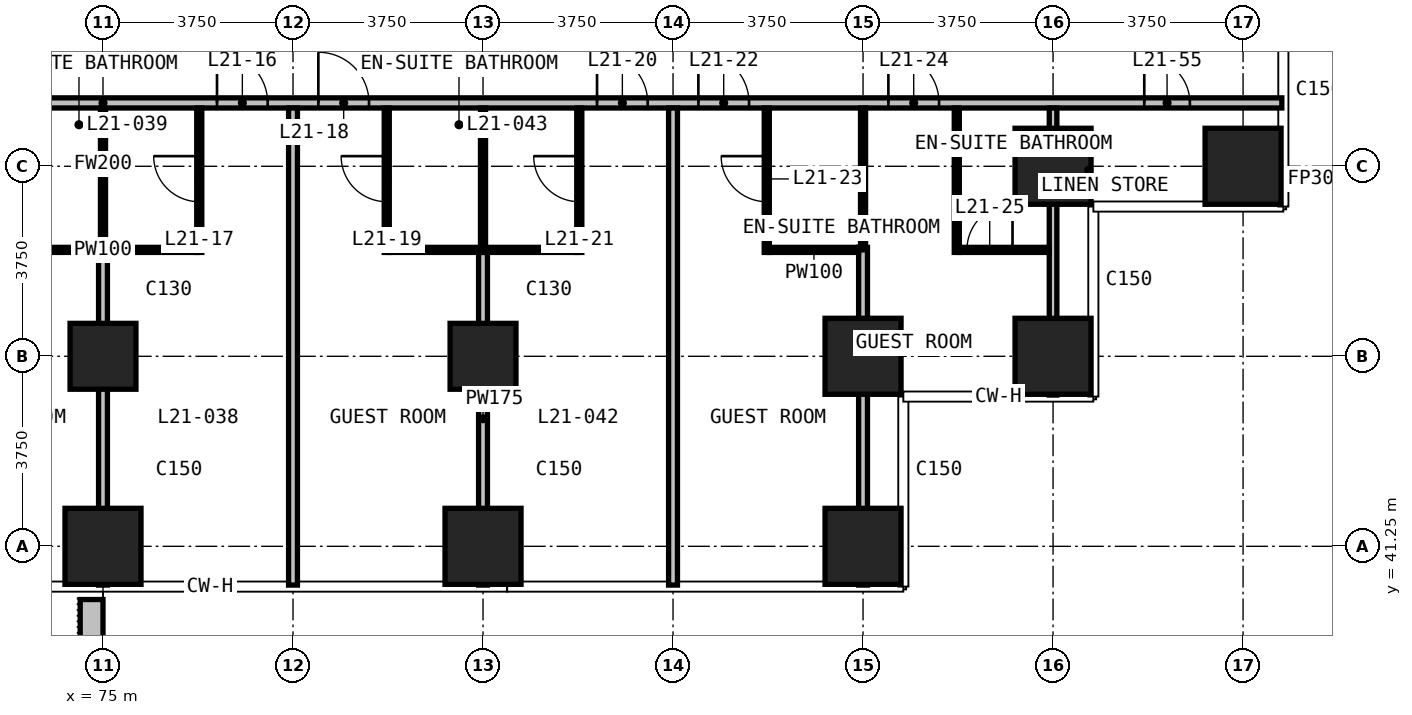
"""IFC4 building model, lengths in metres.
Left out: names, types, materials, properties, quantities, classifications, styles, units other than length and angle.
Written with IfcOpenShell. Run it as: python <this file> out.ifc"""

import sys

from ifc_helpers import new_model, si_unit, direction, frame, frame_2d, origin, origin_2d, place, context, subcontext, project, spatial, rectangle, extrude, element, fill, save


model = new_model("IFC4")
c1 = context("Model", 3, precision=1e-05, world=origin(), true_north=direction((0.0, 1.0)))
c2 = subcontext(c1, "Body", "Model", "MODEL_VIEW")
j1 = project(units=[si_unit("LENGTHUNIT", "METRE"), si_unit("PLANEANGLEUNIT", "RADIAN")], contexts=[c1])
p1 = place(None, origin())
s1 = spatial("IfcSite", under=j1, at=p1, CompositionType="ELEMENT")
p2 = place(p1, origin())
s2 = spatial("IfcBuilding", under=s1, at=p2, CompositionType="ELEMENT")
p3 = place(p2, frame((0.0, 0.0, 89.0)))
s3 = spatial("IfcBuildingStorey", under=s2, at=p3, CompositionType="ELEMENT", Elevation=89.0)
p4 = place(p3, frame((75.0, 41.25, 0.0), z_axis=(0.0, 0.0, 1.0), x_axis=(1.0, 0.0, 0.0)))
e1 = element("IfcColumn", 1, at=p4, inside=s3, PredefinedType="COLUMN", context=c2, shape_type="SweptSolid", body=[
    extrude(rectangle(XDim=1.5, YDim=1.5, at=origin_2d()), origin(), (0.0, 0.0, 1.0), 3.3),
])
p5 = place(p3, frame((75.0, 45.0, 0.0), z_axis=(0.0, 0.0, 1.0), x_axis=(1.0, 0.0, 0.0)))
e2 = element("IfcColumn", 2, at=p5, inside=s3, PredefinedType="COLUMN", context=c2, shape_type="SweptSolid", body=[
    extrude(rectangle(XDim=1.3, YDim=1.3, at=origin_2d()), origin(), (0.0, 0.0, 1.0), 3.3),
])
p6 = place(p3, frame((82.5, 41.25, 0.0), z_axis=(0.0, 0.0, 1.0), x_axis=(1.0, 0.0, 0.0)))
e3 = element("IfcColumn", 3, at=p6, inside=s3, PredefinedType="COLUMN", context=c2, shape_type="SweptSolid", body=[
    extrude(rectangle(XDim=1.5, YDim=1.5, at=origin_2d()), origin(), (0.0, 0.0, 1.0), 3.3),
])
p7 = place(p3, frame((82.5, 45.0, 0.0), z_axis=(0.0, 0.0, 1.0), x_axis=(1.0, 0.0, 0.0)))
e4 = element("IfcColumn", 4, at=p7, inside=s3, PredefinedType="COLUMN", context=c2, shape_type="SweptSolid", body=[
    extrude(rectangle(XDim=1.3, YDim=1.3, at=origin_2d()), origin(), (0.0, 0.0, 1.0), 3.3),
])
for number, where, z_axis, x_axis in (
    (5, (90.0, 41.25, 0.0), (0.0, 0.0, 1.0), (1.0, 0.0, 0.0)),
    (6, (90.0, 45.0, 0.0), (0.0, 0.0, 1.0), (1.0, 0.0, 0.0)),
    (7, (93.75, 45.0, 0.0), (0.0, 0.0, 1.0), (1.0, 0.0, 0.0)),
    (8, (93.75, 48.75, 0.0), (0.0, 0.0, 1.0), (1.0, 0.0, 0.0)),
    (9, (97.5, 48.75, 0.0), (0.0, 0.0, 1.0), (1.0, 0.0, 0.0)),
):
    element("IfcColumn", number, at=place(p3, frame(where, z_axis=z_axis, x_axis=x_axis)), inside=s3, PredefinedType="COLUMN", context=c2, shape_type="SweptSolid", body=[
        extrude(rectangle(XDim=1.5, YDim=1.5, at=origin_2d()), origin(), (0.0, 0.0, 1.0), 3.3),
    ])
p8 = place(p3, frame((74.775, 40.2, 0.0), z_axis=(0.0, 0.0, 1.0), x_axis=(0.0, -1.0, 0.0)))
e10 = element("IfcWall", 10, at=p8, inside=s3, PredefinedType="USERDEFINED", context=c2, shape_type="SweptSolid", body=[
    extrude(rectangle(XDim=2.35, YDim=0.45, at=frame_2d((1.175, 0.0))), origin(), (0.0, 0.0, 1.0), 1.1),
])
p9 = place(p3, frame((51.735, 50.0, 0.0), z_axis=(0.0, 0.0, 1.0), x_axis=(1.0, 0.0, 0.0)))
e11 = element("IfcWall", 11, at=p9, inside=s3, PredefinedType="PARTITIONING", context=c2, shape_type="SweptSolid", body=[
    extrude(rectangle(XDim=46.53, YDim=0.2, at=frame_2d((23.265, 0.0))), origin(), (0.0, 0.0, 1.0), 3.0),
])
p10 = place(p9, frame((6.765, 0.0, 0.0)))
e12 = element("IfcOpeningElement", 12, at=p10, cuts=e11, PredefinedType="OPENING", context=c2, shape_type="SweptSolid", body=[
    extrude(rectangle(XDim=1.0, YDim=2.2, at=frame_2d((0.5, 1.1))), frame((0.0, 0.11, 0.0), z_axis=(0.0, -1.0, 0.0), x_axis=(1.0, 0.0, 0.0)), (0.0, 0.0, 1.0), 0.22),
])
p11 = place(p9, frame((10.515, 0.0, 0.0)))
e13 = element("IfcOpeningElement", 13, at=p11, cuts=e11, PredefinedType="OPENING", context=c2, shape_type="SweptSolid", body=[
    extrude(rectangle(XDim=1.0, YDim=2.2, at=frame_2d((0.5, 1.1))), frame((0.0, 0.11, 0.0), z_axis=(0.0, -1.0, 0.0), x_axis=(1.0, 0.0, 0.0)), (0.0, 0.0, 1.0), 0.22),
])
p12 = place(p9, frame((12.515, 0.0, 0.0)))
e14 = element("IfcOpeningElement", 14, at=p12, cuts=e11, PredefinedType="OPENING", context=c2, shape_type="SweptSolid", body=[
    extrude(rectangle(XDim=1.0, YDim=2.2, at=frame_2d((0.5, 1.1))), frame((0.0, 0.11, 0.0), z_axis=(0.0, -1.0, 0.0), x_axis=(1.0, 0.0, 0.0)), (0.0, 0.0, 1.0), 0.22),
])
p13 = place(p9, frame((18.015, 0.0, 0.0)))
e15 = element("IfcOpeningElement", 15, at=p13, cuts=e11, PredefinedType="OPENING", context=c2, shape_type="SweptSolid", body=[
    extrude(rectangle(XDim=1.0, YDim=2.2, at=frame_2d((0.5, 1.1))), frame((0.0, 0.11, 0.0), z_axis=(0.0, -1.0, 0.0), x_axis=(1.0, 0.0, 0.0)), (0.0, 0.0, 1.0), 0.22),
])
p14 = place(p9, frame((20.015, 0.0, 0.0)))
e16 = element("IfcOpeningElement", 16, at=p14, cuts=e11, PredefinedType="OPENING", context=c2, shape_type="SweptSolid", body=[
    extrude(rectangle(XDim=1.0, YDim=2.2, at=frame_2d((0.5, 1.1))), frame((0.0, 0.11, 0.0), z_axis=(0.0, -1.0, 0.0), x_axis=(1.0, 0.0, 0.0)), (0.0, 0.0, 1.0), 0.22),
])
p15 = place(p9, frame((25.515, 0.0, 0.0)))
e17 = element("IfcOpeningElement", 17, at=p15, cuts=e11, PredefinedType="OPENING", context=c2, shape_type="SweptSolid", body=[
    extrude(rectangle(XDim=1.0, YDim=2.2, at=frame_2d((0.5, 1.1))), frame((0.0, 0.11, 0.0), z_axis=(0.0, -1.0, 0.0), x_axis=(1.0, 0.0, 0.0)), (0.0, 0.0, 1.0), 0.22),
])
p16 = place(p9, frame((27.515, 0.0, 0.0)))
e18 = element("IfcOpeningElement", 18, at=p16, cuts=e11, PredefinedType="OPENING", context=c2, shape_type="SweptSolid", body=[
    extrude(rectangle(XDim=1.0, YDim=2.2, at=frame_2d((0.5, 1.1))), frame((0.0, 0.11, 0.0), z_axis=(0.0, -1.0, 0.0), x_axis=(1.0, 0.0, 0.0)), (0.0, 0.0, 1.0), 0.22),
])
p17 = place(p9, frame((33.015, 0.0, 0.0)))
e19 = element("IfcOpeningElement", 19, at=p17, cuts=e11, PredefinedType="OPENING", context=c2, shape_type="SweptSolid", body=[
    extrude(rectangle(XDim=1.0, YDim=2.2, at=frame_2d((0.5, 1.1))), frame((0.0, 0.11, 0.0), z_axis=(0.0, -1.0, 0.0), x_axis=(1.0, 0.0, 0.0)), (0.0, 0.0, 1.0), 0.22),
])
p18 = place(p9, frame((35.015, 0.0, 0.0)))
e20 = element("IfcOpeningElement", 20, at=p18, cuts=e11, PredefinedType="OPENING", context=c2, shape_type="SweptSolid", body=[
    extrude(rectangle(XDim=1.0, YDim=2.2, at=frame_2d((0.5, 1.1))), frame((0.0, 0.11, 0.0), z_axis=(0.0, -1.0, 0.0), x_axis=(1.0, 0.0, 0.0)), (0.0, 0.0, 1.0), 0.22),
])
p19 = place(p9, frame((38.765, 0.0, 0.0)))
e21 = element("IfcOpeningElement", 21, at=p19, cuts=e11, PredefinedType="OPENING", context=c2, shape_type="SweptSolid", body=[
    extrude(rectangle(XDim=1.0, YDim=2.2, at=frame_2d((0.5, 1.1))), frame((0.0, 0.11, 0.0), z_axis=(0.0, -1.0, 0.0), x_axis=(1.0, 0.0, 0.0)), (0.0, 0.0, 1.0), 0.22),
])
p20 = place(p9, frame((1.8, 0.0, 0.0)))
e22 = element("IfcOpeningElement", 22, at=p20, cuts=e11, PredefinedType="OPENING", context=c2, shape_type="SweptSolid", body=[
    extrude(rectangle(XDim=0.9, YDim=2.2, at=frame_2d((0.45, 1.1))), frame((0.0, 0.11, 0.0), z_axis=(0.0, -1.0, 0.0), x_axis=(1.0, 0.0, 0.0)), (0.0, 0.0, 1.0), 0.22),
])
p21 = place(p9, frame((43.815, 0.0, 0.0)))
e23 = element("IfcOpeningElement", 23, at=p21, cuts=e11, PredefinedType="OPENING", context=c2, shape_type="SweptSolid", body=[
    extrude(rectangle(XDim=0.9, YDim=2.2, at=frame_2d((0.45, 1.1))), frame((0.0, 0.11, 0.0), z_axis=(0.0, -1.0, 0.0), x_axis=(1.0, 0.0, 0.0)), (0.0, 0.0, 1.0), 0.22),
])
p22 = place(p3, frame((75.0, 40.485, 0.0), z_axis=(0.0, 0.0, 1.0), x_axis=(0.0, 1.0, 0.0)))
e24 = element("IfcWall", 24, at=p22, inside=s3, PredefinedType="PARTITIONING", context=c2, shape_type="SweptSolid", body=[
    extrude(rectangle(XDim=6.565, YDim=0.175, at=frame_2d((3.282, 0.0))), origin(), (0.0, 0.0, 1.0), 3.0),
])
p23 = place(p3, frame((78.75, 40.485, 0.0), z_axis=(0.0, 0.0, 1.0), x_axis=(0.0, 1.0, 0.0)))
e25 = element("IfcWall", 25, at=p23, inside=s3, PredefinedType="PARTITIONING", context=c2, shape_type="SweptSolid", body=[
    extrude(rectangle(XDim=9.415, YDim=0.175, at=frame_2d((4.708, 0.0))), origin(), (0.0, 0.0, 1.0), 3.0),
])
p24 = place(p3, frame((82.5, 40.485, 0.0), z_axis=(0.0, 0.0, 1.0), x_axis=(0.0, 1.0, 0.0)))
e26 = element("IfcWall", 26, at=p24, inside=s3, PredefinedType="PARTITIONING", context=c2, shape_type="SweptSolid", body=[
    extrude(rectangle(XDim=6.565, YDim=0.175, at=frame_2d((3.282, 0.0))), origin(), (0.0, 0.0, 1.0), 3.0),
])
p25 = place(p3, frame((86.25, 40.485, 0.0), z_axis=(0.0, 0.0, 1.0), x_axis=(0.0, 1.0, 0.0)))
e27 = element("IfcWall", 27, at=p25, inside=s3, PredefinedType="PARTITIONING", context=c2, shape_type="SweptSolid", body=[
    extrude(rectangle(XDim=9.415, YDim=0.175, at=frame_2d((4.708, 0.0))), origin(), (0.0, 0.0, 1.0), 3.0),
])
p26 = place(p3, frame((90.0, 40.485, 0.0), z_axis=(0.0, 0.0, 1.0), x_axis=(0.0, 1.0, 0.0)))
e28 = element("IfcWall", 28, at=p26, inside=s3, PredefinedType="PARTITIONING", context=c2, shape_type="SweptSolid", body=[
    extrude(rectangle(XDim=6.665, YDim=0.175, at=frame_2d((3.333, 0.0))), origin(), (0.0, 0.0, 1.0), 3.0),
])
p27 = place(p3, frame((93.75, 44.235, 0.0), z_axis=(0.0, 0.0, 1.0), x_axis=(0.0, 1.0, 0.0)))
e29 = element("IfcWall", 29, at=p27, inside=s3, PredefinedType="PARTITIONING", context=c2, shape_type="SweptSolid", body=[
    extrude(rectangle(XDim=5.665, YDim=0.15, at=frame_2d((2.833, 0.0))), origin(), (0.0, 0.0, 1.0), 3.0),
])
for number, where, z_axis, x_axis in (
    (30, (73.15, 47.1, 0.0), (0.0, 0.0, 1.0), (1.0, 0.0, 0.0)),
    (31, (80.65, 47.1, 0.0), (0.0, 0.0, 1.0), (1.0, 0.0, 0.0)),
):
    element("IfcWall", number, at=place(p3, frame(where, z_axis=z_axis, x_axis=x_axis)), inside=s3, PredefinedType="PARTITIONING", context=c2, shape_type="SweptSolid", body=[
        extrude(rectangle(XDim=3.7, YDim=0.1, at=frame_2d((1.85, 0.0))), origin(), (0.0, 0.0, 1.0), 3.0),
    ])
p28 = place(p3, frame((88.15, 47.1, 0.0), z_axis=(0.0, 0.0, 1.0), x_axis=(1.0, 0.0, 0.0)))
e32 = element("IfcWall", 32, at=p28, inside=s3, PredefinedType="PARTITIONING", context=c2, shape_type="SweptSolid", body=[
    extrude(rectangle(XDim=1.762, YDim=0.1, at=frame_2d((0.881, 0.0))), origin(), (0.0, 0.0, 1.0), 3.0),
])
p29 = place(p3, frame((91.9, 47.1, 0.0), z_axis=(0.0, 0.0, 1.0), x_axis=(1.0, 0.0, 0.0)))
e33 = element("IfcWall", 33, at=p29, inside=s3, PredefinedType="PARTITIONING", context=c2, shape_type="SweptSolid", body=[
    extrude(rectangle(XDim=1.775, YDim=0.1, at=frame_2d((0.888, 0.0))), origin(), (0.0, 0.0, 1.0), 3.0),
])
p30 = place(p29, frame((0.15, 0.0, 0.0)))
e34 = element("IfcOpeningElement", 34, at=p30, cuts=e33, PredefinedType="OPENING", context=c2, shape_type="SweptSolid", body=[
    extrude(rectangle(XDim=0.9, YDim=2.2, at=frame_2d((0.45, 1.1))), frame((0.0, 0.06, 0.0), z_axis=(0.0, -1.0, 0.0), x_axis=(1.0, 0.0, 0.0)), (0.0, 0.0, 1.0), 0.12),
])
p31 = place(p3, frame((75.0, 47.15, 0.0), z_axis=(0.0, 0.0, 1.0), x_axis=(0.0, 1.0, 0.0)))
e35 = element("IfcWall", 35, at=p31, inside=s3, PredefinedType="PARTITIONING", context=c2, shape_type="SweptSolid", body=[
    extrude(rectangle(XDim=2.75, YDim=0.1, at=frame_2d((1.375, 0.0))), origin(), (0.0, 0.0, 1.0), 3.0),
])
p32 = place(p3, frame((76.9, 47.05, 0.0), z_axis=(0.0, 0.0, 1.0), x_axis=(0.0, 1.0, 0.0)))
e36 = element("IfcWall", 36, at=p32, inside=s3, PredefinedType="PARTITIONING", context=c2, shape_type="SweptSolid", body=[
    extrude(rectangle(XDim=2.85, YDim=0.1, at=frame_2d((1.425, 0.0))), origin(), (0.0, 0.0, 1.0), 3.0),
])
p33 = place(p32, frame((1.0, 0.0, 0.0)))
e37 = element("IfcOpeningElement", 37, at=p33, cuts=e36, PredefinedType="OPENING", context=c2, shape_type="SweptSolid", body=[
    extrude(rectangle(XDim=0.9, YDim=2.2, at=frame_2d((0.45, 1.1))), frame((0.0, 0.06, 0.0), z_axis=(0.0, -1.0, 0.0), x_axis=(1.0, 0.0, 0.0)), (0.0, 0.0, 1.0), 0.12),
])
p34 = place(p3, frame((80.6, 47.05, 0.0), z_axis=(0.0, 0.0, 1.0), x_axis=(0.0, 1.0, 0.0)))
e38 = element("IfcWall", 38, at=p34, inside=s3, PredefinedType="PARTITIONING", context=c2, shape_type="SweptSolid", body=[
    extrude(rectangle(XDim=2.85, YDim=0.1, at=frame_2d((1.425, 0.0))), origin(), (0.0, 0.0, 1.0), 3.0),
])
p35 = place(p34, frame((1.0, 0.0, 0.0)))
e39 = element("IfcOpeningElement", 39, at=p35, cuts=e38, PredefinedType="OPENING", context=c2, shape_type="SweptSolid", body=[
    extrude(rectangle(XDim=0.9, YDim=2.2, at=frame_2d((0.45, 1.1))), frame((0.0, 0.06, 0.0), z_axis=(0.0, -1.0, 0.0), x_axis=(1.0, 0.0, 0.0)), (0.0, 0.0, 1.0), 0.12),
])
p36 = place(p3, frame((82.5, 47.15, 0.0), z_axis=(0.0, 0.0, 1.0), x_axis=(0.0, 1.0, 0.0)))
e40 = element("IfcWall", 40, at=p36, inside=s3, PredefinedType="PARTITIONING", context=c2, shape_type="SweptSolid", body=[
    extrude(rectangle(XDim=2.75, YDim=0.1, at=frame_2d((1.375, 0.0))), origin(), (0.0, 0.0, 1.0), 3.0),
])
p37 = place(p3, frame((84.4, 47.05, 0.0), z_axis=(0.0, 0.0, 1.0), x_axis=(0.0, 1.0, 0.0)))
e41 = element("IfcWall", 41, at=p37, inside=s3, PredefinedType="PARTITIONING", context=c2, shape_type="SweptSolid", body=[
    extrude(rectangle(XDim=2.85, YDim=0.1, at=frame_2d((1.425, 0.0))), origin(), (0.0, 0.0, 1.0), 3.0),
])
p38 = place(p37, frame((1.0, 0.0, 0.0)))
e42 = element("IfcOpeningElement", 42, at=p38, cuts=e41, PredefinedType="OPENING", context=c2, shape_type="SweptSolid", body=[
    extrude(rectangle(XDim=0.9, YDim=2.2, at=frame_2d((0.45, 1.1))), frame((0.0, 0.06, 0.0), z_axis=(0.0, -1.0, 0.0), x_axis=(1.0, 0.0, 0.0)), (0.0, 0.0, 1.0), 0.12),
])
p39 = place(p3, frame((88.1, 47.05, 0.0), z_axis=(0.0, 0.0, 1.0), x_axis=(0.0, 1.0, 0.0)))
e43 = element("IfcWall", 43, at=p39, inside=s3, PredefinedType="PARTITIONING", context=c2, shape_type="SweptSolid", body=[
    extrude(rectangle(XDim=2.85, YDim=0.1, at=frame_2d((1.425, 0.0))), origin(), (0.0, 0.0, 1.0), 3.0),
])
p40 = place(p39, frame((1.0, 0.0, 0.0)))
e44 = element("IfcOpeningElement", 44, at=p40, cuts=e43, PredefinedType="OPENING", context=c2, shape_type="SweptSolid", body=[
    extrude(rectangle(XDim=0.9, YDim=2.2, at=frame_2d((0.45, 1.1))), frame((0.0, 0.06, 0.0), z_axis=(0.0, -1.0, 0.0), x_axis=(1.0, 0.0, 0.0)), (0.0, 0.0, 1.0), 0.12),
])
p41 = place(p3, frame((90.0, 47.1, 0.0), z_axis=(0.0, 0.0, 1.0), x_axis=(0.0, 1.0, 0.0)))
e45 = element("IfcWall", 45, at=p41, inside=s3, PredefinedType="PARTITIONING", context=c2, shape_type="SweptSolid", body=[
    extrude(rectangle(XDim=2.8, YDim=0.1, at=frame_2d((1.4, 0.0))), origin(), (0.0, 0.0, 1.0), 3.0),
])
p42 = place(p3, frame((91.85, 47.05, 0.0), z_axis=(0.0, 0.0, 1.0), x_axis=(0.0, 1.0, 0.0)))
e46 = element("IfcWall", 46, at=p42, inside=s3, PredefinedType="PARTITIONING", context=c2, shape_type="SweptSolid", body=[
    extrude(rectangle(XDim=2.85, YDim=0.1, at=frame_2d((1.425, 0.0))), origin(), (0.0, 0.0, 1.0), 3.0),
])
p43 = place(p15, origin())
e47 = element("IfcDoor", 47, at=p43, inside=s3, OperationType="SINGLE_SWING_RIGHT", PredefinedType="DOOR", context=c2, shape_type="SweptSolid", body=[
    extrude(rectangle(XDim=1.0, YDim=2.2, at=frame_2d((0.5, 1.1))), frame((0.0, 0.025, 0.0), z_axis=(0.0, -1.0, 0.0), x_axis=(1.0, 0.0, 0.0)), (0.0, 0.0, 1.0), 0.05),
])
fill(e17, e47)
p44 = place(p33, origin())
e48 = element("IfcDoor", 48, at=p44, inside=s3, OperationType="SINGLE_SWING_RIGHT", PredefinedType="DOOR", context=c2, shape_type="SweptSolid", body=[
    extrude(rectangle(XDim=0.9, YDim=2.2, at=frame_2d((0.45, 1.1))), frame((0.0, 0.025, 0.0), z_axis=(0.0, -1.0, 0.0), x_axis=(1.0, 0.0, 0.0)), (0.0, 0.0, 1.0), 0.05),
])
fill(e37, e48)
p45 = place(p16, origin())
e49 = element("IfcDoor", 49, at=p45, inside=s3, OperationType="SINGLE_SWING_RIGHT", PredefinedType="DOOR", context=c2, shape_type="SweptSolid", body=[
    extrude(rectangle(XDim=1.0, YDim=2.2, at=frame_2d((0.5, 1.1))), frame((0.0, 0.025, 0.0), z_axis=(0.0, -1.0, 0.0), x_axis=(1.0, 0.0, 0.0)), (0.0, 0.0, 1.0), 0.05),
])
fill(e18, e49)
p46 = place(p35, origin())
e50 = element("IfcDoor", 50, at=p46, inside=s3, OperationType="SINGLE_SWING_RIGHT", PredefinedType="DOOR", context=c2, shape_type="SweptSolid", body=[
    extrude(rectangle(XDim=0.9, YDim=2.2, at=frame_2d((0.45, 1.1))), frame((0.0, 0.025, 0.0), z_axis=(0.0, -1.0, 0.0), x_axis=(1.0, 0.0, 0.0)), (0.0, 0.0, 1.0), 0.05),
])
fill(e39, e50)
p47 = place(p17, origin())
e51 = element("IfcDoor", 51, at=p47, inside=s3, OperationType="SINGLE_SWING_RIGHT", PredefinedType="DOOR", context=c2, shape_type="SweptSolid", body=[
    extrude(rectangle(XDim=1.0, YDim=2.2, at=frame_2d((0.5, 1.1))), frame((0.0, 0.025, 0.0), z_axis=(0.0, -1.0, 0.0), x_axis=(1.0, 0.0, 0.0)), (0.0, 0.0, 1.0), 0.05),
])
fill(e19, e51)
p48 = place(p38, origin())
e52 = element("IfcDoor", 52, at=p48, inside=s3, OperationType="SINGLE_SWING_RIGHT", PredefinedType="DOOR", context=c2, shape_type="SweptSolid", body=[
    extrude(rectangle(XDim=0.9, YDim=2.2, at=frame_2d((0.45, 1.1))), frame((0.0, 0.025, 0.0), z_axis=(0.0, -1.0, 0.0), x_axis=(1.0, 0.0, 0.0)), (0.0, 0.0, 1.0), 0.05),
])
fill(e42, e52)
p49 = place(p18, origin())
e53 = element("IfcDoor", 53, at=p49, inside=s3, OperationType="SINGLE_SWING_LEFT", PredefinedType="DOOR", context=c2, shape_type="SweptSolid", body=[
    extrude(rectangle(XDim=1.0, YDim=2.2, at=frame_2d((0.5, 1.1))), frame((0.0, 0.025, 0.0), z_axis=(0.0, -1.0, 0.0), x_axis=(1.0, 0.0, 0.0)), (0.0, 0.0, 1.0), 0.05),
])
fill(e20, e53)
p50 = place(p40, origin())
e54 = element("IfcDoor", 54, at=p50, inside=s3, OperationType="SINGLE_SWING_RIGHT", PredefinedType="DOOR", context=c2, shape_type="SweptSolid", body=[
    extrude(rectangle(XDim=0.9, YDim=2.2, at=frame_2d((0.45, 1.1))), frame((0.0, 0.025, 0.0), z_axis=(0.0, -1.0, 0.0), x_axis=(1.0, 0.0, 0.0)), (0.0, 0.0, 1.0), 0.05),
])
fill(e44, e54)
p51 = place(p19, origin())
e55 = element("IfcDoor", 55, at=p51, inside=s3, OperationType="SINGLE_SWING_LEFT", PredefinedType="DOOR", context=c2, shape_type="SweptSolid", body=[
    extrude(rectangle(XDim=1.0, YDim=2.2, at=frame_2d((0.5, 1.1))), frame((0.0, 0.025, 0.0), z_axis=(0.0, -1.0, 0.0), x_axis=(1.0, 0.0, 0.0)), (0.0, 0.0, 1.0), 0.05),
])
fill(e21, e55)
p52 = place(p30, origin())
e56 = element("IfcDoor", 56, at=p52, inside=s3, OperationType="SINGLE_SWING_RIGHT", PredefinedType="DOOR", context=c2, shape_type="SweptSolid", body=[
    extrude(rectangle(XDim=0.9, YDim=2.2, at=frame_2d((0.45, 1.1))), frame((0.0, 0.025, 0.0), z_axis=(0.0, -1.0, 0.0), x_axis=(1.0, 0.0, 0.0)), (0.0, 0.0, 1.0), 0.05),
])
fill(e34, e56)
p53 = place(p21, origin())
e57 = element("IfcDoor", 57, at=p53, inside=s3, OperationType="SINGLE_SWING_LEFT", PredefinedType="DOOR", context=c2, shape_type="SweptSolid", body=[
    extrude(rectangle(XDim=0.9, YDim=2.2, at=frame_2d((0.45, 1.1))), frame((0.0, 0.025, 0.0), z_axis=(0.0, -1.0, 0.0), x_axis=(1.0, 0.0, 0.0)), (0.0, 0.0, 1.0), 0.05),
])
fill(e23, e57)
save(model, sys.argv[1])
